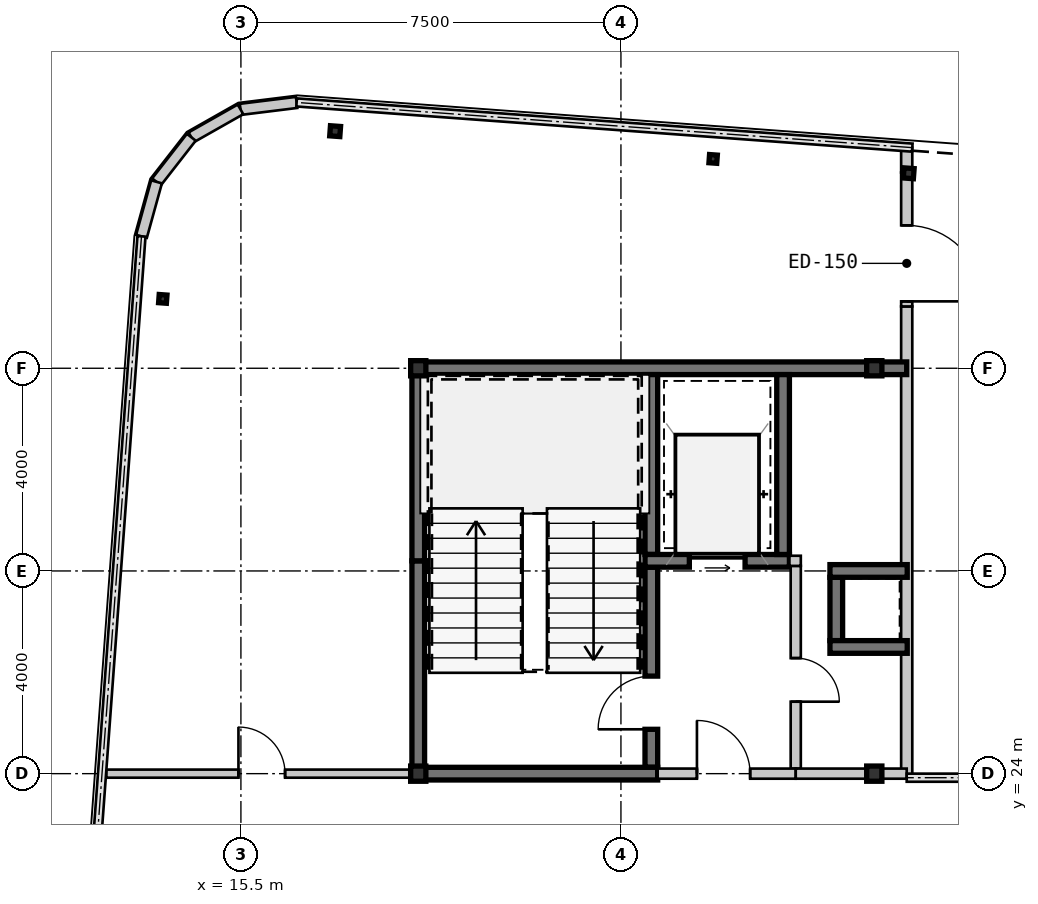
"""IFC4 building model, lengths in metres.
Left out: names, types, materials, properties, quantities, classifications, styles, units other than length and angle.
Written with IfcOpenShell. Run it as: python <this file> out.ifc"""

import sys

from ifc_helpers import new_model, si_unit, direction, frame, frame_2d, origin, origin_2d, place, context, subcontext, project, spatial, rectangle, hollow_rectangle, i_section, extrude, source, transform, mapped, element, fill, save


model = new_model("IFC4")
c1 = context("Model", 3, precision=1e-05, world=origin(), true_north=direction((0.0, 1.0)))
c2 = subcontext(c1, "Body", "Model", "MODEL_VIEW")
j1 = project(units=[si_unit("LENGTHUNIT", "METRE"), si_unit("PLANEANGLEUNIT", "RADIAN")], contexts=[c1])
p1 = place(None, origin())
s1 = spatial("IfcSite", under=j1, at=p1, CompositionType="ELEMENT")
p2 = place(p1, origin())
s2 = spatial("IfcBuilding", under=s1, at=p2, CompositionType="ELEMENT")
p3 = place(p2, frame((0.0, 0.0, 227.15)))
s3 = spatial("IfcBuildingStorey", under=s2, at=p3, CompositionType="ELEMENT", Elevation=227.15)
m1 = source(origin(), c2, "Body", "SweptSolid", [
    extrude(hollow_rectangle(XDim=0.3, YDim=0.3, WallThickness=0.012, at=origin_2d()), origin(), (0.0, 0.0, 1.0), 3.15),
])
for number, where, z_axis, x_axis in (
    (1, (19.0, 24.0, 0.0), (0.0, 0.0, 1.0), (1.0, 0.0, 0.0)),
    (2, (28.0, 24.0, 0.0), (0.0, 0.0, 1.0), (1.0, 0.0, 0.0)),
    (3, (19.0, 32.0, 0.0), (0.0, 0.0, 1.0), (1.0, 0.0, 0.0)),
    (4, (28.0, 32.0, 0.0), (0.0, 0.0, 1.0), (1.0, 0.0, 0.0)),
):
    element("IfcColumn", number, at=place(p3, frame(where, z_axis=z_axis, x_axis=x_axis)), inside=s3, PredefinedType="COLUMN", context=c2, shape_type="MappedRepresentation", body=[
        mapped(m1, transform((0.0, 0.0, 0.0), scale=1.0)),
    ])
m2 = source(origin(), c2, "Body", "SweptSolid", [
    extrude(hollow_rectangle(XDim=0.2, YDim=0.2, WallThickness=0.009, at=origin_2d()), origin(), (0.0, 0.0, 1.0), 3.15),
])
p4 = place(p3, frame((17.36, 36.679, 0.0), z_axis=(0.0, 0.0, 1.0), x_axis=(0.997314477224, -0.073238197128, 0.0)))
e5 = element("IfcColumn", 5, at=p4, inside=s3, PredefinedType="COLUMN", context=c2, shape_type="MappedRepresentation", body=[
    mapped(m2, transform((0.0, 0.0, 0.0), scale=1.0)),
])
m3 = source(origin(), c2, "Body", "SweptSolid", [
    extrude(i_section(OverallWidth=0.154, OverallDepth=0.162, WebThickness=0.008, FlangeThickness=0.011, at=origin_2d()), origin(), (0.0, 0.0, 1.0), 3.15),
])
for number, where, z_axis, x_axis in (
    (6, (24.82, 36.131, 0.0), (0.0, 0.0, 1.0), (0.997, -0.073, 0.0)),
    (7, (13.958, 33.369, 0.0), (0.0, 0.0, 1.0), (0.997, -0.073, 0.0)),
):
    element("IfcColumn", number, at=place(p3, frame(where, z_axis=z_axis, x_axis=x_axis)), inside=s3, PredefinedType="COLUMN", context=c2, shape_type="MappedRepresentation", body=[
        mapped(m3, transform((0.0, 0.0, 0.0), scale=1.0)),
    ])
p5 = place(p3, frame((28.679, 35.848, 0.0), z_axis=(0.0, 0.0, 1.0), x_axis=(0.997314477224, -0.073238197128, 0.0)))
e8 = element("IfcColumn", 8, at=p5, inside=s3, PredefinedType="COLUMN", context=c2, shape_type="MappedRepresentation", body=[
    mapped(m2, transform((0.0, 0.0, 0.0), scale=1.0)),
])
m4 = source(origin(), c2, "Body", "SweptSolid", [
    extrude(rectangle(XDim=1.116, YDim=0.22, at=frame_2d((0.558, 0.0))), origin(), (0.0, 0.0, 1.0), 2.93),
])
p6 = place(p3, frame((16.599, 37.246, 0.0), z_axis=(0.0, 0.0, 1.0), x_axis=(-0.992441899189, -0.122715429897, 0.0)))
e9 = element("IfcWall", 9, at=p6, inside=s3, PredefinedType="SOLIDWALL", context=c2, shape_type="MappedRepresentation", body=[
    mapped(m4, transform((0.0, 0.0, 0.0), scale=1.0)),
])
m5 = source(origin(), c2, "Body", "SweptSolid", [
    extrude(rectangle(XDim=1.116, YDim=0.22, at=frame_2d((0.558, 0.0))), origin(), (0.0, 0.0, 1.0), 2.93),
])
p7 = place(p3, frame((15.492, 37.109, 0.0), z_axis=(0.0, 0.0, 1.0), x_axis=(-0.869934579941, -0.493167138628, 0.0)))
e10 = element("IfcWall", 10, at=p7, inside=s3, PredefinedType="SOLIDWALL", context=c2, shape_type="MappedRepresentation", body=[
    mapped(m5, transform((0.0, 0.0, 0.0), scale=1.0)),
])
m6 = source(origin(), c2, "Body", "SweptSolid", [
    extrude(rectangle(XDim=1.116, YDim=0.22, at=frame_2d((0.558, 0.0))), origin(), (0.0, 0.0, 1.0), 2.93),
])
p8 = place(p3, frame((14.521, 36.559, 0.0), z_axis=(0.0, 0.0, 1.0), x_axis=(-0.614909386406, -0.788597772321, 0.0)))
e11 = element("IfcWall", 11, at=p8, inside=s3, PredefinedType="SOLIDWALL", context=c2, shape_type="MappedRepresentation", body=[
    mapped(m6, transform((0.0, 0.0, 0.0), scale=1.0)),
])
p9 = place(p3, frame((13.835, 35.679, 0.0), z_axis=(0.0, 0.0, 1.0), x_axis=(-0.266300605026, -0.963890028874, 0.0)))
e12 = element("IfcWall", 12, at=p9, inside=s3, PredefinedType="SOLIDWALL", context=c2, shape_type="MappedRepresentation", body=[
    mapped(m5, transform((0.0, 0.0, 0.0), scale=1.0)),
])
m7 = source(origin(), c2, "Body", "SweptSolid", [
    extrude(rectangle(XDim=9.3, YDim=0.22, at=frame_2d((4.65, 0.0))), origin(), (0.0, 0.0, 1.0), 2.93),
])
p10 = place(p3, frame((28.64, 23.92, 0.0), z_axis=(0.0, 0.0, 1.0), x_axis=(0.0, 1.0, 0.0)))
e13 = element("IfcWall", 13, at=p10, inside=s3, PredefinedType="SOLIDWALL", context=c2, shape_type="MappedRepresentation", body=[
    mapped(m7, transform((0.0, 0.0, 0.0), scale=1.0)),
])
m8 = source(origin(), c2, "Body", "SweptSolid", [
    extrude(rectangle(XDim=2.643, YDim=0.22, at=frame_2d((1.322, 0.0))), origin(), (0.0, 0.0, 1.0), 2.524),
])
p11 = place(p3, frame((28.64, 33.22, 0.0), z_axis=(0.0, 0.0, 1.0), x_axis=(0.0, 1.0, 0.0)))
e14 = element("IfcWall", 14, at=p11, inside=s3, PredefinedType="SOLIDWALL", context=c2, shape_type="MappedRepresentation", body=[
    mapped(m8, transform((0.0, 0.0, 0.0), scale=1.0)),
])
m9 = source(origin(), c2, "Body", "SweptSolid", [
    extrude(rectangle(XDim=1.5, YDim=2.2, at=frame_2d((0.75, 1.1))), frame((0.0, 0.12, 0.0), z_axis=(0.0, -1.0, 0.0), x_axis=(1.0, 0.0, 0.0)), (0.0, 0.0, 1.0), 0.24),
])
p12 = place(p11, frame((0.1, 0.0, 0.0)))
e15 = element("IfcOpeningElement", 15, at=p12, cuts=e14, PredefinedType="OPENING", context=c2, shape_type="MappedRepresentation", body=[
    mapped(m9, transform((0.0, 0.0, 0.0), scale=1.0)),
])
m10 = source(origin(), c2, "Body", "SweptSolid", [
    extrude(rectangle(XDim=0.491, YDim=0.22, at=frame_2d((0.245, 0.0))), origin(), (0.0, 0.0, 1.0), 2.93),
])
p13 = place(p3, frame((28.64, 35.863, 0.0), z_axis=(0.0, 0.0, 1.0), x_axis=(0.0, 1.0, 0.0)))
e16 = element("IfcWall", 16, at=p13, inside=s3, PredefinedType="SOLIDWALL", context=c2, shape_type="MappedRepresentation", body=[
    mapped(m10, transform((0.0, 0.0, 0.0), scale=1.0)),
])
m11 = source(origin(), c2, "Body", "SweptSolid", [
    extrude(rectangle(XDim=9.125, YDim=0.25, at=frame_2d((4.562, 0.0))), origin(), (0.0, 0.0, 1.0), 2.93),
])
p14 = place(p3, frame((18.875, 32.0, 0.0), z_axis=(0.0, 0.0, 1.0), x_axis=(1.0, 0.0, 0.0)))
e17 = element("IfcWall", 17, at=p14, inside=s3, PredefinedType="SHEAR", context=c2, shape_type="MappedRepresentation", body=[
    mapped(m11, transform((0.0, 0.0, 0.0), scale=1.0)),
])
m12 = source(origin(), c2, "Body", "SweptSolid", [
    extrude(rectangle(XDim=0.64, YDim=0.25, at=frame_2d((0.32, 0.0))), origin(), (0.0, 0.0, 1.0), 2.93),
])
p15 = place(p3, frame((28.0, 32.0, 0.0), z_axis=(0.0, 0.0, 1.0), x_axis=(1.0, 0.0, 0.0)))
e18 = element("IfcWall", 18, at=p15, inside=s3, PredefinedType="SHEAR", context=c2, shape_type="MappedRepresentation", body=[
    mapped(m12, transform((0.0, 0.0, 0.0), scale=1.0)),
])
m13 = source(origin(), c2, "Body", "SweptSolid", [
    extrude(rectangle(XDim=4.075, YDim=0.25, at=frame_2d((2.038, 0.0))), origin(), (0.0, 0.0, 1.0), 2.93),
])
p16 = place(p3, frame((19.0, 24.125, 0.0), z_axis=(0.0, 0.0, 1.0), x_axis=(0.0, 1.0, 0.0)))
e19 = element("IfcWall", 19, at=p16, inside=s3, PredefinedType="SHEAR", context=c2, shape_type="MappedRepresentation", body=[
    mapped(m13, transform((0.0, 0.0, 0.0), scale=1.0)),
])
m14 = source(origin(), c2, "Body", "SweptSolid", [
    extrude(rectangle(XDim=3.675, YDim=0.25, at=frame_2d((1.837, 0.0))), origin(), (0.0, 0.0, 1.0), 2.93),
])
p17 = place(p3, frame((19.0, 28.2, 0.0), z_axis=(0.0, 0.0, 1.0), x_axis=(0.0, 1.0, 0.0)))
e20 = element("IfcWall", 20, at=p17, inside=s3, PredefinedType="SHEAR", context=c2, shape_type="MappedRepresentation", body=[
    mapped(m14, transform((0.0, 0.0, 0.0), scale=1.0)),
])
m15 = source(origin(), c2, "Body", "SweptSolid", [
    extrude(rectangle(XDim=3.55, YDim=0.25, at=frame_2d((1.775, 0.0))), origin(), (0.0, 0.0, 1.0), 2.93),
])
p18 = place(p3, frame((23.6, 28.325, 0.0), z_axis=(0.0, 0.0, 1.0), x_axis=(0.0, 1.0, 0.0)))
e21 = element("IfcWall", 21, at=p18, inside=s3, PredefinedType="SHEAR", context=c2, shape_type="MappedRepresentation", body=[
    mapped(m15, transform((0.0, 0.0, 0.0), scale=1.0)),
])
m16 = source(origin(), c2, "Body", "SweptSolid", [
    extrude(rectangle(XDim=3.95, YDim=0.25, at=frame_2d((1.975, 0.0))), origin(), (0.0, 0.0, 1.0), 2.93),
])
p19 = place(p3, frame((23.6, 24.125, 0.0), z_axis=(0.0, 0.0, 1.0), x_axis=(0.0, 1.0, 0.0)))
e22 = element("IfcWall", 22, at=p19, inside=s3, PredefinedType="SHEAR", context=c2, shape_type="MappedRepresentation", body=[
    mapped(m16, transform((0.0, 0.0, 0.0), scale=1.0)),
])
m17 = source(origin(), c2, "Body", "SweptSolid", [
    extrude(rectangle(XDim=1.05, YDim=2.1, at=frame_2d((0.525, 1.05))), frame((0.0, 0.135, 0.0), z_axis=(0.0, -1.0, 0.0), x_axis=(1.0, 0.0, 0.0)), (0.0, 0.0, 1.0), 0.27),
])
p20 = place(p19, frame((0.75, 0.0, 0.0)))
e23 = element("IfcOpeningElement", 23, at=p20, cuts=e22, PredefinedType="OPENING", context=c2, shape_type="MappedRepresentation", body=[
    mapped(m17, transform((0.0, 0.0, 0.0), scale=1.0)),
])
m18 = source(origin(), c2, "Body", "SweptSolid", [
    extrude(rectangle(XDim=4.85, YDim=0.25, at=frame_2d((2.425, 0.0))), origin(), (0.0, 0.0, 1.0), 2.93),
])
p21 = place(p3, frame((18.875, 24.0, 0.0), z_axis=(0.0, 0.0, 1.0), x_axis=(1.0, 0.0, 0.0)))
e24 = element("IfcWall", 24, at=p21, inside=s3, PredefinedType="SHEAR", context=c2, shape_type="MappedRepresentation", body=[
    mapped(m18, transform((0.0, 0.0, 0.0), scale=1.0)),
])
m19 = source(origin(), c2, "Body", "SweptSolid", [
    extrude(rectangle(XDim=2.85, YDim=0.25, at=frame_2d((1.425, 0.0))), origin(), (0.0, 0.0, 1.0), 2.93),
])
p22 = place(p3, frame((23.475, 28.2, 0.0), z_axis=(0.0, 0.0, 1.0), x_axis=(1.0, 0.0, 0.0)))
e25 = element("IfcWall", 25, at=p22, inside=s3, PredefinedType="SHEAR", context=c2, shape_type="MappedRepresentation", body=[
    mapped(m19, transform((0.0, 0.0, 0.0), scale=1.0)),
])
m20 = source(origin(), c2, "Body", "SweptSolid", [
    extrude(rectangle(XDim=1.1, YDim=2.15, at=frame_2d((0.55, 1.075))), frame((0.0, 0.135, 0.0), z_axis=(0.0, -1.0, 0.0), x_axis=(1.0, 0.0, 0.0)), (0.0, 0.0, 1.0), 0.27),
])
p23 = place(p22, frame((0.875, 0.0, 0.0)))
e26 = element("IfcOpeningElement", 26, at=p23, cuts=e25, PredefinedType="OPENING", context=c2, shape_type="MappedRepresentation", body=[
    mapped(m20, transform((0.0, 0.0, 0.0), scale=1.0)),
])
p24 = place(p3, frame((26.2, 28.325, 0.0), z_axis=(0.0, 0.0, 1.0), x_axis=(0.0, 1.0, 0.0)))
e27 = element("IfcWall", 27, at=p24, inside=s3, PredefinedType="SHEAR", context=c2, shape_type="MappedRepresentation", body=[
    mapped(m15, transform((0.0, 0.0, 0.0), scale=1.0)),
])
m21 = source(origin(), c2, "Body", "SweptSolid", [
    extrude(rectangle(XDim=4.0, YDim=0.2, at=frame_2d((2.0, 0.0))), origin(), (0.0, 0.0, 1.0), 2.93),
])
p25 = place(p3, frame((26.45, 24.1, 0.0), z_axis=(0.0, 0.0, 1.0), x_axis=(0.0, 1.0, 0.0)))
e28 = element("IfcWall", 28, at=p25, inside=s3, PredefinedType="SOLIDWALL", context=c2, shape_type="MappedRepresentation", body=[
    mapped(m21, transform((0.0, 0.0, 0.0), scale=1.0)),
])
m22 = source(origin(), c2, "Body", "SweptSolid", [
    extrude(rectangle(XDim=0.86, YDim=2.1, at=frame_2d((0.43, 1.05))), frame((0.0, 0.11, 0.0), z_axis=(0.0, -1.0, 0.0), x_axis=(1.0, 0.0, 0.0)), (0.0, 0.0, 1.0), 0.22),
])
p26 = place(p25, frame((1.32, 0.0, 0.0)))
e29 = element("IfcOpeningElement", 29, at=p26, cuts=e28, PredefinedType="OPENING", context=c2, shape_type="MappedRepresentation", body=[
    mapped(m22, transform((0.0, 0.0, 0.0), scale=1.0)),
])
m23 = source(origin(), c2, "Body", "SweptSolid", [
    extrude(rectangle(XDim=2.725, YDim=0.2, at=frame_2d((1.362, 0.0))), origin(), (0.0, 0.0, 1.0), 2.47),
])
p27 = place(p3, frame((23.725, 24.0, 0.0), z_axis=(0.0, 0.0, 1.0), x_axis=(1.0, 0.0, 0.0)))
e30 = element("IfcWall", 30, at=p27, inside=s3, PredefinedType="SOLIDWALL", context=c2, shape_type="MappedRepresentation", body=[
    mapped(m23, transform((0.0, 0.0, 0.0), scale=1.0)),
])
m24 = source(origin(), c2, "Body", "SweptSolid", [
    extrude(rectangle(XDim=1.05, YDim=2.1, at=frame_2d((0.525, 1.05))), frame((0.0, 0.11, 0.0), z_axis=(0.0, -1.0, 0.0), x_axis=(1.0, 0.0, 0.0)), (0.0, 0.0, 1.0), 0.22),
])
p28 = place(p27, frame((0.775, 0.0, 0.0)))
e31 = element("IfcOpeningElement", 31, at=p28, cuts=e30, PredefinedType="OPENING", context=c2, shape_type="MappedRepresentation", body=[
    mapped(m24, transform((0.0, 0.0, 0.0), scale=1.0)),
])
m25 = source(origin(), c2, "Body", "SweptSolid", [
    extrude(rectangle(XDim=1.25, YDim=0.25, at=frame_2d((0.625, 0.0))), origin(), (0.0, 0.0, 1.0), 2.93),
])
p29 = place(p3, frame((27.25, 27.875, 0.0), z_axis=(0.0, 0.0, 1.0), x_axis=(0.0, -1.0, 0.0)))
e32 = element("IfcWall", 32, at=p29, inside=s3, PredefinedType="SHEAR", context=c2, shape_type="MappedRepresentation", body=[
    mapped(m25, transform((0.0, 0.0, 0.0), scale=1.0)),
])
m26 = source(origin(), c2, "Body", "SweptSolid", [
    extrude(rectangle(XDim=1.525, YDim=0.25, at=frame_2d((0.762, 0.0))), origin(), (0.0, 0.0, 1.0), 2.93),
])
for number, where, z_axis, x_axis in (
    (33, (28.65, 28.0, 0.0), (0.0, 0.0, 1.0), (-1.0, 0.0, 0.0)),
    (34, (27.125, 26.5, 0.0), (0.0, 0.0, 1.0), (1.0, 0.0, 0.0)),
):
    element("IfcWall", number, at=place(p3, frame(where, z_axis=z_axis, x_axis=x_axis)), inside=s3, PredefinedType="SHEAR", context=c2, shape_type="MappedRepresentation", body=[
        mapped(m26, transform((0.0, 0.0, 0.0), scale=1.0)),
    ])
m27 = source(origin(), c2, "Body", "SweptSolid", [
    extrude(rectangle(XDim=0.64, YDim=0.2, at=frame_2d((0.32, 0.0))), origin(), (0.0, 0.0, 1.0), 2.23),
])
p30 = place(p3, frame((28.64, 24.0, 0.0), z_axis=(0.0, 0.0, 1.0), x_axis=(-1.0, 0.0, 0.0)))
e35 = element("IfcWall", 35, at=p30, inside=s3, PredefinedType="SOLIDWALL", context=c2, shape_type="MappedRepresentation", body=[
    mapped(m27, transform((0.0, 0.0, 0.0), scale=1.0)),
])
m28 = source(origin(), c2, "Body", "SweptSolid", [
    extrude(rectangle(XDim=1.55, YDim=0.2, at=frame_2d((0.775, 0.0))), origin(), (0.0, 0.0, 1.0), 2.47),
])
p31 = place(p3, frame((28.0, 24.0, 0.0), z_axis=(0.0, 0.0, 1.0), x_axis=(-1.0, 0.0, 0.0)))
e36 = element("IfcWall", 36, at=p31, inside=s3, PredefinedType="SOLIDWALL", context=c2, shape_type="MappedRepresentation", body=[
    mapped(m28, transform((0.0, 0.0, 0.0), scale=1.0)),
])
m29 = source(origin(), c2, "Body", "SweptSolid", [
    extrude(rectangle(XDim=6.032, YDim=0.16, at=frame_2d((3.016, 0.0))), origin(), (0.0, 0.0, 1.0), 2.93),
])
p32 = place(p3, frame((12.843, 24.0, 0.0), z_axis=(0.0, 0.0, 1.0), x_axis=(1.0, 0.0, 0.0)))
e37 = element("IfcWall", 37, at=p32, inside=s3, PredefinedType="PARTITIONING", context=c2, shape_type="MappedRepresentation", body=[
    mapped(m29, transform((0.0, 0.0, 0.0), scale=1.0)),
])
m30 = source(origin(), c2, "Body", "SweptSolid", [
    extrude(rectangle(XDim=0.92, YDim=2.1, at=frame_2d((0.46, 1.05))), frame((0.0, 0.09, 0.0), z_axis=(0.0, -1.0, 0.0), x_axis=(1.0, 0.0, 0.0)), (0.0, 0.0, 1.0), 0.18),
])
p33 = place(p32, frame((2.608, 0.0, 0.0)))
e38 = element("IfcOpeningElement", 38, at=p33, cuts=e37, PredefinedType="OPENING", context=c2, shape_type="MappedRepresentation", body=[
    mapped(m30, transform((0.0, 0.0, 0.0), scale=1.0)),
])
m31 = source(origin(), c2, "Body", "SweptSolid", [
    extrude(rectangle(XDim=0.225, YDim=0.2, at=frame_2d((0.113, 0.0))), origin(), (0.0, 0.0, 1.0), 2.93),
])
p34 = place(p3, frame((26.325, 28.2, 0.0), z_axis=(0.0, 0.0, 1.0), x_axis=(1.0, 0.0, 0.0)))
e39 = element("IfcWall", 39, at=p34, inside=s3, PredefinedType="SOLIDWALL", context=c2, shape_type="MappedRepresentation", body=[
    mapped(m31, transform((0.0, 0.0, 0.0), scale=1.0)),
])
m32 = source(origin(), c2, "Body", "SweptSolid", [
    extrude(rectangle(XDim=1.5, YDim=2.2, at=frame_2d((0.75, 1.1))), frame((0.0, 0.025, 0.0), z_axis=(0.0, -1.0, 0.0), x_axis=(1.0, 0.0, 0.0)), (0.0, 0.0, 1.0), 0.05),
])
p35 = place(p12, frame((1.5, 0.0, 0.0), z_axis=(0.0, 0.0, 1.0), x_axis=(-1.0, 0.0, 0.0)))
e40 = element("IfcDoor", 40, at=p35, inside=s3, OperationType="SINGLE_SWING_RIGHT", PredefinedType="DOOR", context=c2, shape_type="MappedRepresentation", body=[
    mapped(m32, transform((0.0, 0.0, 0.0), scale=1.0)),
])
fill(e15, e40)
m33 = source(origin(), c2, "Body", "SweptSolid", [
    extrude(rectangle(XDim=1.05, YDim=2.1, at=frame_2d((0.525, 1.05))), frame((0.0, 0.025, 0.0), z_axis=(0.0, -1.0, 0.0), x_axis=(1.0, 0.0, 0.0)), (0.0, 0.0, 1.0), 0.05),
])
p36 = place(p20, origin())
e41 = element("IfcDoor", 41, at=p36, inside=s3, OperationType="SINGLE_SWING_LEFT", PredefinedType="DOOR", context=c2, shape_type="MappedRepresentation", body=[
    mapped(m33, transform((0.0, 0.0, 0.0), scale=1.0)),
])
fill(e23, e41)
m34 = source(origin(), c2, "Body", "SweptSolid", [
    extrude(rectangle(XDim=1.1, YDim=2.15, at=frame_2d((0.55, 1.075))), frame((0.0, 0.025, 0.0), z_axis=(0.0, -1.0, 0.0), x_axis=(1.0, 0.0, 0.0)), (0.0, 0.0, 1.0), 0.05),
])
p37 = place(p23, origin())
e42 = element("IfcDoor", 42, at=p37, inside=s3, OperationType="SLIDING_TO_LEFT", PredefinedType="DOOR", context=c2, shape_type="MappedRepresentation", body=[
    mapped(m34, transform((0.0, 0.0, 0.0), scale=1.0)),
])
fill(e26, e42)
p38 = place(p28, origin())
e43 = element("IfcDoor", 43, at=p38, inside=s3, OperationType="SINGLE_SWING_LEFT", PredefinedType="DOOR", context=c2, shape_type="MappedRepresentation", body=[
    mapped(m33, transform((0.0, 0.0, 0.0), scale=1.0)),
])
fill(e31, e43)
m35 = source(origin(), c2, "Body", "SweptSolid", [
    extrude(rectangle(XDim=0.92, YDim=2.1, at=frame_2d((0.46, 1.05))), frame((0.0, 0.025, 0.0), z_axis=(0.0, -1.0, 0.0), x_axis=(1.0, 0.0, 0.0)), (0.0, 0.0, 1.0), 0.05),
])
p39 = place(p33, origin())
e44 = element("IfcDoor", 44, at=p39, inside=s3, OperationType="SINGLE_SWING_LEFT", PredefinedType="DOOR", context=c2, shape_type="MappedRepresentation", body=[
    mapped(m35, transform((0.0, 0.0, 0.0), scale=1.0)),
])
fill(e38, e44)
m36 = source(origin(), c2, "Body", "SweptSolid", [
    extrude(rectangle(XDim=0.86, YDim=2.1, at=frame_2d((0.43, 1.05))), frame((0.0, 0.025, 0.0), z_axis=(0.0, -1.0, 0.0), x_axis=(1.0, 0.0, 0.0)), (0.0, 0.0, 1.0), 0.05),
])
p40 = place(p26, frame((0.86, 0.0, 0.0), z_axis=(0.0, 0.0, 1.0), x_axis=(-1.0, 0.0, 0.0)))
e45 = element("IfcDoor", 45, at=p40, inside=s3, OperationType="SINGLE_SWING_RIGHT", PredefinedType="DOOR", context=c2, shape_type="MappedRepresentation", body=[
    mapped(m36, transform((0.0, 0.0, 0.0), scale=1.0)),
])
fill(e29, e45)
save(model, sys.argv[1])
